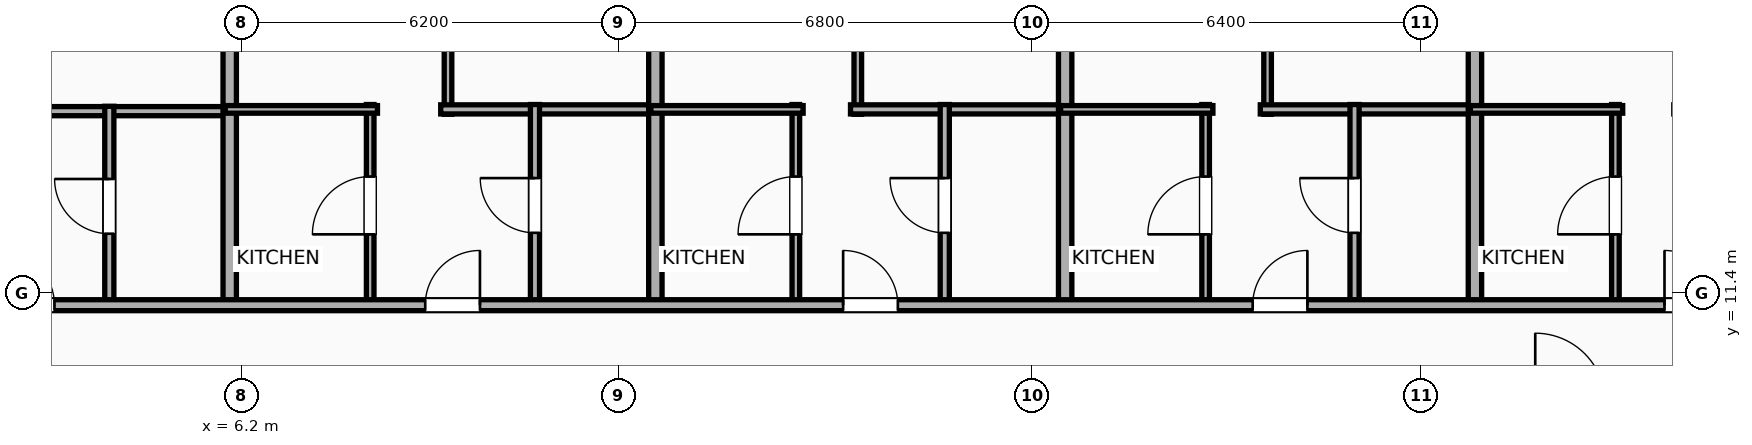
"""IFC4 building model, lengths in metres.
Left out: names, types, materials, properties, quantities, classifications, styles, units other than length and angle.
Written with IfcOpenShell. Run it as: python <this file> out.ifc"""

import sys

from ifc_helpers import new_model, si_unit, direction, frame, frame_2d, origin, place, context, subcontext, project, spatial, rectangle, extrude, element, fill, save


model = new_model("IFC4")
c1 = context("Model", 3, precision=1e-05, world=origin(), true_north=direction((0.0, 1.0)))
c2 = subcontext(c1, "Body", "Model", "MODEL_VIEW")
j1 = project(units=[si_unit("LENGTHUNIT", "METRE"), si_unit("PLANEANGLEUNIT", "RADIAN")], contexts=[c1])
p1 = place(None, origin())
s1 = spatial("IfcSite", under=j1, at=p1, CompositionType="ELEMENT")
p2 = place(p1, origin())
s2 = spatial("IfcBuilding", under=s1, at=p2, CompositionType="ELEMENT")
p3 = place(p2, frame((0.0, 0.0, 120.9)))
s3 = spatial("IfcBuildingStorey", under=s2, at=p3, CompositionType="ELEMENT", Elevation=120.9)
p4 = place(p3, frame((2.47, 14.391, 0.0), z_axis=(0.0, 0.0, 1.0), x_axis=(1.0, 0.0, 0.0)))
e1 = element("IfcWall", 1, at=p4, inside=s3, PredefinedType="PLUMBINGWALL", context=c2, shape_type="SweptSolid", body=[
    extrude(rectangle(XDim=3.605, YDim=0.15, at=frame_2d((1.802, 0.0))), origin(), (0.0, 0.0, 1.0), 3.65),
])
p5 = place(p3, frame((4.02, 11.18, 0.0), z_axis=(0.0, 0.0, 1.0), x_axis=(0.0, 1.0, 0.0)))
e2 = element("IfcWall", 2, at=p5, inside=s3, PredefinedType="PLUMBINGWALL", context=c2, shape_type="SweptSolid", body=[
    extrude(rectangle(XDim=3.291, YDim=0.15, at=frame_2d((1.646, 0.0))), origin(), (0.0, 0.0, 1.0), 3.65),
])
p6 = place(p5, frame((1.196, 0.0, 0.0)))
e3 = element("IfcOpeningElement", 3, at=p6, cuts=e2, PredefinedType="OPENING", context=c2, shape_type="SweptSolid", body=[
    extrude(rectangle(XDim=0.9, YDim=2.05, at=frame_2d((0.45, 1.025))), frame((0.0, 0.085, 0.0), z_axis=(0.0, -1.0, 0.0), x_axis=(1.0, 0.0, 0.0)), (0.0, 0.0, 1.0), 0.17),
])
p7 = place(p3, frame((6.0, 11.12, 0.0), z_axis=(0.0, 0.0, 1.0), x_axis=(0.0, 1.0, 0.0)))
e4 = element("IfcWall", 4, at=p7, inside=s3, PredefinedType="PARTITIONING", context=c2, shape_type="SweptSolid", body=[
    extrude(rectangle(XDim=10.49, YDim=0.22, at=frame_2d((5.245, 0.0))), origin(), (0.0, 0.0, 1.0), 3.04),
])
p8 = place(p3, frame((9.59, 14.34, 0.0), z_axis=(0.0, 0.0, 1.0), x_axis=(0.0, 1.0, 0.0)))
e5 = element("IfcWall", 5, at=p8, inside=s3, PredefinedType="PARTITIONING", context=c2, shape_type="SweptSolid", body=[
    extrude(rectangle(XDim=7.42, YDim=0.125, at=frame_2d((3.71, 0.0))), origin(), (0.0, 0.0, 1.0), 3.65),
])
p9 = place(p8, frame((1.331, 0.0, 0.0)))
e6 = element("IfcOpeningElement", 6, at=p9, cuts=e5, PredefinedType="OPENING", context=c2, shape_type="SweptSolid", body=[
    extrude(rectangle(XDim=0.9, YDim=2.05, at=frame_2d((0.45, 1.025))), frame((0.0, 0.073, 0.0), z_axis=(0.0, -1.0, 0.0), x_axis=(1.0, 0.0, 0.0)), (0.0, 0.0, 1.0), 0.145),
])
p10 = place(p3, frame((9.47, 14.42, 0.0), z_axis=(0.0, 0.0, 1.0), x_axis=(1.0, 0.0, 0.0)))
e7 = element("IfcWall", 7, at=p10, inside=s3, PredefinedType="PLUMBINGWALL", context=c2, shape_type="SweptSolid", body=[
    extrude(rectangle(XDim=3.605, YDim=0.15, at=frame_2d((1.802, 0.0))), origin(), (0.0, 0.0, 1.0), 3.65),
])
p11 = place(p3, frame((8.31, 11.18, 0.0), z_axis=(0.0, 0.0, 1.0), x_axis=(0.0, 1.0, 0.0)))
e8 = element("IfcWall", 8, at=p11, inside=s3, PredefinedType="PARTITIONING", context=c2, shape_type="SweptSolid", body=[
    extrude(rectangle(XDim=3.32, YDim=0.125, at=frame_2d((1.66, 0.0))), origin(), (0.0, 0.0, 1.0), 3.65),
])
p12 = place(p11, frame((1.185, 0.0, 0.0)))
e9 = element("IfcOpeningElement", 9, at=p12, cuts=e8, PredefinedType="OPENING", context=c2, shape_type="SweptSolid", body=[
    extrude(rectangle(XDim=0.95, YDim=2.05, at=frame_2d((0.475, 1.025))), frame((0.0, 0.073, 0.0), z_axis=(0.0, -1.0, 0.0), x_axis=(1.0, 0.0, 0.0)), (0.0, 0.0, 1.0), 0.145),
])
p13 = place(p3, frame((5.925, 14.42, 0.0), z_axis=(0.0, 0.0, 1.0), x_axis=(1.0, 0.0, 0.0)))
e10 = element("IfcWall", 10, at=p13, inside=s3, PredefinedType="PARTITIONING", context=c2, shape_type="SweptSolid", body=[
    extrude(rectangle(XDim=2.505, YDim=0.125, at=frame_2d((1.252, 0.0))), origin(), (0.0, 0.0, 1.0), 3.65),
])
p14 = place(p3, frame((11.02, 11.18, 0.0), z_axis=(0.0, 0.0, 1.0), x_axis=(0.0, 1.0, 0.0)))
e11 = element("IfcWall", 11, at=p14, inside=s3, PredefinedType="PLUMBINGWALL", context=c2, shape_type="SweptSolid", body=[
    extrude(rectangle(XDim=3.32, YDim=0.15, at=frame_2d((1.66, 0.0))), origin(), (0.0, 0.0, 1.0), 3.65),
])
p15 = place(p14, frame((1.21, 0.0, 0.0)))
e12 = element("IfcOpeningElement", 12, at=p15, cuts=e11, PredefinedType="OPENING", context=c2, shape_type="SweptSolid", body=[
    extrude(rectangle(XDim=0.9, YDim=2.05, at=frame_2d((0.45, 1.025))), frame((0.0, 0.085, 0.0), z_axis=(0.0, -1.0, 0.0), x_axis=(1.0, 0.0, 0.0)), (0.0, 0.0, 1.0), 0.17),
])
p16 = place(p3, frame((13.0, 11.12, 0.0), z_axis=(0.0, 0.0, 1.0), x_axis=(0.0, 1.0, 0.0)))
e13 = element("IfcWall", 13, at=p16, inside=s3, PredefinedType="PARTITIONING", context=c2, shape_type="SweptSolid", body=[
    extrude(rectangle(XDim=10.49, YDim=0.22, at=frame_2d((5.245, 0.0))), origin(), (0.0, 0.0, 1.0), 3.65),
])
p17 = place(p3, frame((16.329, 14.34, 0.0), z_axis=(0.0, 0.0, 1.0), x_axis=(0.0, 1.0, 0.0)))
e14 = element("IfcWall", 14, at=p17, inside=s3, PredefinedType="PARTITIONING", context=c2, shape_type="SweptSolid", body=[
    extrude(rectangle(XDim=7.42, YDim=0.125, at=frame_2d((3.71, 0.0))), origin(), (0.0, 0.0, 1.0), 3.65),
])
p18 = place(p17, frame((1.331, 0.0, 0.0)))
e15 = element("IfcOpeningElement", 15, at=p18, cuts=e14, PredefinedType="OPENING", context=c2, shape_type="SweptSolid", body=[
    extrude(rectangle(XDim=0.9, YDim=2.05, at=frame_2d((0.45, 1.025))), frame((0.0, 0.073, 0.0), z_axis=(0.0, -1.0, 0.0), x_axis=(1.0, 0.0, 0.0)), (0.0, 0.0, 1.0), 0.145),
])
p19 = place(p3, frame((16.209, 14.42, 0.0), z_axis=(0.0, 0.0, 1.0), x_axis=(1.0, 0.0, 0.0)))
e16 = element("IfcWall", 16, at=p19, inside=s3, PredefinedType="PLUMBINGWALL", context=c2, shape_type="SweptSolid", body=[
    extrude(rectangle(XDim=3.605, YDim=0.15, at=frame_2d((1.802, 0.0))), origin(), (0.0, 0.0, 1.0), 3.65),
])
p20 = place(p3, frame((15.31, 11.18, 0.0), z_axis=(0.0, 0.0, 1.0), x_axis=(0.0, 1.0, 0.0)))
e17 = element("IfcWall", 17, at=p20, inside=s3, PredefinedType="PARTITIONING", context=c2, shape_type="SweptSolid", body=[
    extrude(rectangle(XDim=3.32, YDim=0.125, at=frame_2d((1.66, 0.0))), origin(), (0.0, 0.0, 1.0), 3.65),
])
p21 = place(p20, frame((1.185, 0.0, 0.0)))
e18 = element("IfcOpeningElement", 18, at=p21, cuts=e17, PredefinedType="OPENING", context=c2, shape_type="SweptSolid", body=[
    extrude(rectangle(XDim=0.95, YDim=2.05, at=frame_2d((0.475, 1.025))), frame((0.0, 0.073, 0.0), z_axis=(0.0, -1.0, 0.0), x_axis=(1.0, 0.0, 0.0)), (0.0, 0.0, 1.0), 0.145),
])
p22 = place(p3, frame((12.925, 14.42, 0.0), z_axis=(0.0, 0.0, 1.0), x_axis=(1.0, 0.0, 0.0)))
e19 = element("IfcWall", 19, at=p22, inside=s3, PredefinedType="PARTITIONING", context=c2, shape_type="SweptSolid", body=[
    extrude(rectangle(XDim=2.505, YDim=0.125, at=frame_2d((1.252, 0.0))), origin(), (0.0, 0.0, 1.0), 3.65),
])
p23 = place(p3, frame((17.759, 11.18, 0.0), z_axis=(0.0, 0.0, 1.0), x_axis=(0.0, 1.0, 0.0)))
e20 = element("IfcWall", 20, at=p23, inside=s3, PredefinedType="PLUMBINGWALL", context=c2, shape_type="SweptSolid", body=[
    extrude(rectangle(XDim=3.32, YDim=0.15, at=frame_2d((1.66, 0.0))), origin(), (0.0, 0.0, 1.0), 3.65),
])
p24 = place(p23, frame((1.21, 0.0, 0.0)))
e21 = element("IfcOpeningElement", 21, at=p24, cuts=e20, PredefinedType="OPENING", context=c2, shape_type="SweptSolid", body=[
    extrude(rectangle(XDim=0.9, YDim=2.05, at=frame_2d((0.45, 1.025))), frame((0.0, 0.085, 0.0), z_axis=(0.0, -1.0, 0.0), x_axis=(1.0, 0.0, 0.0)), (0.0, 0.0, 1.0), 0.17),
])
p25 = place(p3, frame((19.739, 11.12, 0.0), z_axis=(0.0, 0.0, 1.0), x_axis=(0.0, 1.0, 0.0)))
e22 = element("IfcWall", 22, at=p25, inside=s3, PredefinedType="PARTITIONING", context=c2, shape_type="SweptSolid", body=[
    extrude(rectangle(XDim=10.49, YDim=0.22, at=frame_2d((5.245, 0.0))), origin(), (0.0, 0.0, 1.0), 3.65),
])
p26 = place(p3, frame((23.068, 14.34, 0.0), z_axis=(0.0, 0.0, 1.0), x_axis=(0.0, 1.0, 0.0)))
e23 = element("IfcWall", 23, at=p26, inside=s3, PredefinedType="PARTITIONING", context=c2, shape_type="SweptSolid", body=[
    extrude(rectangle(XDim=7.42, YDim=0.125, at=frame_2d((3.71, 0.0))), origin(), (0.0, 0.0, 1.0), 3.65),
])
p27 = place(p26, frame((1.331, 0.0, 0.0)))
e24 = element("IfcOpeningElement", 24, at=p27, cuts=e23, PredefinedType="OPENING", context=c2, shape_type="SweptSolid", body=[
    extrude(rectangle(XDim=0.9, YDim=2.05, at=frame_2d((0.45, 1.025))), frame((0.0, 0.073, 0.0), z_axis=(0.0, -1.0, 0.0), x_axis=(1.0, 0.0, 0.0)), (0.0, 0.0, 1.0), 0.145),
])
p28 = place(p3, frame((22.948, 14.42, 0.0), z_axis=(0.0, 0.0, 1.0), x_axis=(1.0, 0.0, 0.0)))
e25 = element("IfcWall", 25, at=p28, inside=s3, PredefinedType="PLUMBINGWALL", context=c2, shape_type="SweptSolid", body=[
    extrude(rectangle(XDim=3.605, YDim=0.15, at=frame_2d((1.802, 0.0))), origin(), (0.0, 0.0, 1.0), 3.65),
])
p29 = place(p3, frame((22.049, 11.18, 0.0), z_axis=(0.0, 0.0, 1.0), x_axis=(0.0, 1.0, 0.0)))
e26 = element("IfcWall", 26, at=p29, inside=s3, PredefinedType="PARTITIONING", context=c2, shape_type="SweptSolid", body=[
    extrude(rectangle(XDim=3.32, YDim=0.125, at=frame_2d((1.66, 0.0))), origin(), (0.0, 0.0, 1.0), 3.65),
])
p30 = place(p29, frame((1.185, 0.0, 0.0)))
e27 = element("IfcOpeningElement", 27, at=p30, cuts=e26, PredefinedType="OPENING", context=c2, shape_type="SweptSolid", body=[
    extrude(rectangle(XDim=0.95, YDim=2.05, at=frame_2d((0.475, 1.025))), frame((0.0, 0.073, 0.0), z_axis=(0.0, -1.0, 0.0), x_axis=(1.0, 0.0, 0.0)), (0.0, 0.0, 1.0), 0.145),
])
p31 = place(p3, frame((19.664, 14.42, 0.0), z_axis=(0.0, 0.0, 1.0), x_axis=(1.0, 0.0, 0.0)))
e28 = element("IfcWall", 28, at=p31, inside=s3, PredefinedType="PARTITIONING", context=c2, shape_type="SweptSolid", body=[
    extrude(rectangle(XDim=2.505, YDim=0.125, at=frame_2d((1.252, 0.0))), origin(), (0.0, 0.0, 1.0), 3.65),
])
p32 = place(p3, frame((24.498, 11.18, 0.0), z_axis=(0.0, 0.0, 1.0), x_axis=(0.0, 1.0, 0.0)))
e29 = element("IfcWall", 29, at=p32, inside=s3, PredefinedType="PLUMBINGWALL", context=c2, shape_type="SweptSolid", body=[
    extrude(rectangle(XDim=3.32, YDim=0.15, at=frame_2d((1.66, 0.0))), origin(), (0.0, 0.0, 1.0), 3.65),
])
p33 = place(p32, frame((1.21, 0.0, 0.0)))
e30 = element("IfcOpeningElement", 30, at=p33, cuts=e29, PredefinedType="OPENING", context=c2, shape_type="SweptSolid", body=[
    extrude(rectangle(XDim=0.9, YDim=2.05, at=frame_2d((0.45, 1.025))), frame((0.0, 0.085, 0.0), z_axis=(0.0, -1.0, 0.0), x_axis=(1.0, 0.0, 0.0)), (0.0, 0.0, 1.0), 0.17),
])
p34 = place(p3, frame((26.478, 11.12, 0.0), z_axis=(0.0, 0.0, 1.0), x_axis=(0.0, 1.0, 0.0)))
e31 = element("IfcWall", 31, at=p34, inside=s3, PredefinedType="PARTITIONING", context=c2, shape_type="SweptSolid", body=[
    extrude(rectangle(XDim=10.49, YDim=0.22, at=frame_2d((5.245, 0.0))), origin(), (0.0, 0.0, 1.0), 3.65),
])
p35 = place(p3, frame((28.788, 11.18, 0.0), z_axis=(0.0, 0.0, 1.0), x_axis=(0.0, 1.0, 0.0)))
e32 = element("IfcWall", 32, at=p35, inside=s3, PredefinedType="PARTITIONING", context=c2, shape_type="SweptSolid", body=[
    extrude(rectangle(XDim=3.32, YDim=0.125, at=frame_2d((1.66, 0.0))), origin(), (0.0, 0.0, 1.0), 3.65),
])
p36 = place(p35, frame((1.185, 0.0, 0.0)))
e33 = element("IfcOpeningElement", 33, at=p36, cuts=e32, PredefinedType="OPENING", context=c2, shape_type="SweptSolid", body=[
    extrude(rectangle(XDim=0.95, YDim=2.05, at=frame_2d((0.475, 1.025))), frame((0.0, 0.073, 0.0), z_axis=(0.0, -1.0, 0.0), x_axis=(1.0, 0.0, 0.0)), (0.0, 0.0, 1.0), 0.145),
])
p37 = place(p3, frame((26.403, 14.42, 0.0), z_axis=(0.0, 0.0, 1.0), x_axis=(1.0, 0.0, 0.0)))
e34 = element("IfcWall", 34, at=p37, inside=s3, PredefinedType="PARTITIONING", context=c2, shape_type="SweptSolid", body=[
    extrude(rectangle(XDim=2.505, YDim=0.125, at=frame_2d((1.252, 0.0))), origin(), (0.0, 0.0, 1.0), 3.65),
])
p38 = place(p3, frame((-29.21, 11.2, 0.0), z_axis=(0.0, 0.0, 1.0), x_axis=(1.0, 0.0, 0.0)))
e35 = element("IfcWall", 35, at=p38, inside=s3, PredefinedType="PARTITIONING", context=c2, shape_type="SweptSolid", body=[
    extrude(rectangle(XDim=62.42, YDim=0.18, at=frame_2d((31.21, 0.0))), origin(), (0.0, 0.0, 1.0), 3.65),
])
p39 = place(p38, frame((3.108, 0.0, 0.0)))
e36 = element("IfcOpeningElement", 36, at=p39, cuts=e35, PredefinedType="OPENING", context=c2, shape_type="SweptSolid", body=[
    extrude(rectangle(XDim=1.15, YDim=2.05, at=frame_2d((0.575, 1.025))), frame((0.0, 0.1, 0.0), z_axis=(0.0, -1.0, 0.0), x_axis=(1.0, 0.0, 0.0)), (0.0, 0.0, 1.0), 0.2),
])
p40 = place(p38, frame((10.242, 0.0, 0.0)))
e37 = element("IfcOpeningElement", 37, at=p40, cuts=e35, PredefinedType="OPENING", context=c2, shape_type="SweptSolid", body=[
    extrude(rectangle(XDim=1.15, YDim=2.05, at=frame_2d((0.575, 1.025))), frame((0.0, 0.1, 0.0), z_axis=(0.0, -1.0, 0.0), x_axis=(1.0, 0.0, 0.0)), (0.0, 0.0, 1.0), 0.2),
])
p41 = place(p38, frame((17.427, 0.0, 0.0)))
e38 = element("IfcOpeningElement", 38, at=p41, cuts=e35, PredefinedType="OPENING", context=c2, shape_type="SweptSolid", body=[
    extrude(rectangle(XDim=0.9, YDim=2.05, at=frame_2d((0.45, 1.025))), frame((0.0, 0.1, 0.0), z_axis=(0.0, -1.0, 0.0), x_axis=(1.0, 0.0, 0.0)), (0.0, 0.0, 1.0), 0.2),
])
p42 = place(p38, frame((24.424, 0.0, 0.0)))
e39 = element("IfcOpeningElement", 39, at=p42, cuts=e35, PredefinedType="OPENING", context=c2, shape_type="SweptSolid", body=[
    extrude(rectangle(XDim=0.9, YDim=2.05, at=frame_2d((0.45, 1.025))), frame((0.0, 0.1, 0.0), z_axis=(0.0, -1.0, 0.0), x_axis=(1.0, 0.0, 0.0)), (0.0, 0.0, 1.0), 0.2),
])
p43 = place(p38, frame((31.428, 0.0, 0.0)))
e40 = element("IfcOpeningElement", 40, at=p43, cuts=e35, PredefinedType="OPENING", context=c2, shape_type="SweptSolid", body=[
    extrude(rectangle(XDim=0.9, YDim=2.05, at=frame_2d((0.45, 1.025))), frame((0.0, 0.1, 0.0), z_axis=(0.0, -1.0, 0.0), x_axis=(1.0, 0.0, 0.0)), (0.0, 0.0, 1.0), 0.2),
])
p44 = place(p38, frame((38.425, 0.0, 0.0)))
e41 = element("IfcOpeningElement", 41, at=p44, cuts=e35, PredefinedType="OPENING", context=c2, shape_type="SweptSolid", body=[
    extrude(rectangle(XDim=0.9, YDim=2.05, at=frame_2d((0.45, 1.025))), frame((0.0, 0.1, 0.0), z_axis=(0.0, -1.0, 0.0), x_axis=(1.0, 0.0, 0.0)), (0.0, 0.0, 1.0), 0.2),
])
p45 = place(p38, frame((45.298, 0.0, 0.0)))
e42 = element("IfcOpeningElement", 42, at=p45, cuts=e35, PredefinedType="OPENING", context=c2, shape_type="SweptSolid", body=[
    extrude(rectangle(XDim=0.9, YDim=2.05, at=frame_2d((0.45, 1.025))), frame((0.0, 0.1, 0.0), z_axis=(0.0, -1.0, 0.0), x_axis=(1.0, 0.0, 0.0)), (0.0, 0.0, 1.0), 0.2),
])
p46 = place(p38, frame((52.033, 0.0, 0.0)))
e43 = element("IfcOpeningElement", 43, at=p46, cuts=e35, PredefinedType="OPENING", context=c2, shape_type="SweptSolid", body=[
    extrude(rectangle(XDim=0.9, YDim=2.05, at=frame_2d((0.45, 1.025))), frame((0.0, 0.1, 0.0), z_axis=(0.0, -1.0, 0.0), x_axis=(1.0, 0.0, 0.0)), (0.0, 0.0, 1.0), 0.2),
])
p47 = place(p38, frame((58.805, 0.0, 0.0)))
e44 = element("IfcOpeningElement", 44, at=p47, cuts=e35, PredefinedType="OPENING", context=c2, shape_type="SweptSolid", body=[
    extrude(rectangle(XDim=0.9, YDim=2.05, at=frame_2d((0.45, 1.025))), frame((0.0, 0.1, 0.0), z_axis=(0.0, -1.0, 0.0), x_axis=(1.0, 0.0, 0.0)), (0.0, 0.0, 1.0), 0.2),
])
p48 = place(p6, origin())
e45 = element("IfcDoor", 45, at=p48, inside=s3, OperationType="SINGLE_SWING_RIGHT", PredefinedType="DOOR", context=c2, shape_type="SweptSolid", body=[
    extrude(rectangle(XDim=0.9, YDim=2.05, at=frame_2d((0.45, 1.025))), frame((0.0, 0.025, 0.0), z_axis=(0.0, -1.0, 0.0), x_axis=(1.0, 0.0, 0.0)), (0.0, 0.0, 1.0), 0.05),
])
fill(e3, e45)
p49 = place(p12, origin())
e46 = element("IfcDoor", 46, at=p49, inside=s3, OperationType="SINGLE_SWING_LEFT", PredefinedType="DOOR", context=c2, shape_type="SweptSolid", body=[
    extrude(rectangle(XDim=0.95, YDim=2.05, at=frame_2d((0.475, 1.025))), frame((0.0, 0.025, 0.0), z_axis=(0.0, -1.0, 0.0), x_axis=(1.0, 0.0, 0.0)), (0.0, 0.0, 1.0), 0.05),
])
fill(e9, e46)
p50 = place(p15, origin())
e47 = element("IfcDoor", 47, at=p50, inside=s3, OperationType="SINGLE_SWING_RIGHT", PredefinedType="DOOR", context=c2, shape_type="SweptSolid", body=[
    extrude(rectangle(XDim=0.9, YDim=2.05, at=frame_2d((0.45, 1.025))), frame((0.0, 0.025, 0.0), z_axis=(0.0, -1.0, 0.0), x_axis=(1.0, 0.0, 0.0)), (0.0, 0.0, 1.0), 0.05),
])
fill(e12, e47)
p51 = place(p21, origin())
e48 = element("IfcDoor", 48, at=p51, inside=s3, OperationType="SINGLE_SWING_LEFT", PredefinedType="DOOR", context=c2, shape_type="SweptSolid", body=[
    extrude(rectangle(XDim=0.95, YDim=2.05, at=frame_2d((0.475, 1.025))), frame((0.0, 0.025, 0.0), z_axis=(0.0, -1.0, 0.0), x_axis=(1.0, 0.0, 0.0)), (0.0, 0.0, 1.0), 0.05),
])
fill(e18, e48)
p52 = place(p24, origin())
e49 = element("IfcDoor", 49, at=p52, inside=s3, OperationType="SINGLE_SWING_RIGHT", PredefinedType="DOOR", context=c2, shape_type="SweptSolid", body=[
    extrude(rectangle(XDim=0.9, YDim=2.05, at=frame_2d((0.45, 1.025))), frame((0.0, 0.025, 0.0), z_axis=(0.0, -1.0, 0.0), x_axis=(1.0, 0.0, 0.0)), (0.0, 0.0, 1.0), 0.05),
])
fill(e21, e49)
p53 = place(p30, origin())
e50 = element("IfcDoor", 50, at=p53, inside=s3, OperationType="SINGLE_SWING_LEFT", PredefinedType="DOOR", context=c2, shape_type="SweptSolid", body=[
    extrude(rectangle(XDim=0.95, YDim=2.05, at=frame_2d((0.475, 1.025))), frame((0.0, 0.025, 0.0), z_axis=(0.0, -1.0, 0.0), x_axis=(1.0, 0.0, 0.0)), (0.0, 0.0, 1.0), 0.05),
])
fill(e27, e50)
p54 = place(p33, origin())
e51 = element("IfcDoor", 51, at=p54, inside=s3, OperationType="SINGLE_SWING_RIGHT", PredefinedType="DOOR", context=c2, shape_type="SweptSolid", body=[
    extrude(rectangle(XDim=0.9, YDim=2.05, at=frame_2d((0.45, 1.025))), frame((0.0, 0.025, 0.0), z_axis=(0.0, -1.0, 0.0), x_axis=(1.0, 0.0, 0.0)), (0.0, 0.0, 1.0), 0.05),
])
fill(e30, e51)
p55 = place(p36, origin())
e52 = element("IfcDoor", 52, at=p55, inside=s3, OperationType="SINGLE_SWING_LEFT", PredefinedType="DOOR", context=c2, shape_type="SweptSolid", body=[
    extrude(rectangle(XDim=0.95, YDim=2.05, at=frame_2d((0.475, 1.025))), frame((0.0, 0.025, 0.0), z_axis=(0.0, -1.0, 0.0), x_axis=(1.0, 0.0, 0.0)), (0.0, 0.0, 1.0), 0.05),
])
fill(e33, e52)
p56 = place(p43, origin())
e53 = element("IfcDoor", 53, at=p56, inside=s3, OperationType="SINGLE_SWING_LEFT", PredefinedType="DOOR", context=c2, shape_type="SweptSolid", body=[
    extrude(rectangle(XDim=0.9, YDim=2.05, at=frame_2d((0.45, 1.025))), frame((0.0, 0.025, 0.0), z_axis=(0.0, -1.0, 0.0), x_axis=(1.0, 0.0, 0.0)), (0.0, 0.0, 1.0), 0.05),
])
fill(e40, e53)
p57 = place(p44, origin())
e54 = element("IfcDoor", 54, at=p57, inside=s3, OperationType="SINGLE_SWING_RIGHT", PredefinedType="DOOR", context=c2, shape_type="SweptSolid", body=[
    extrude(rectangle(XDim=0.9, YDim=2.05, at=frame_2d((0.45, 1.025))), frame((0.0, 0.025, 0.0), z_axis=(0.0, -1.0, 0.0), x_axis=(1.0, 0.0, 0.0)), (0.0, 0.0, 1.0), 0.05),
])
fill(e41, e54)
p58 = place(p45, origin())
e55 = element("IfcDoor", 55, at=p58, inside=s3, OperationType="SINGLE_SWING_LEFT", PredefinedType="DOOR", context=c2, shape_type="SweptSolid", body=[
    extrude(rectangle(XDim=0.9, YDim=2.05, at=frame_2d((0.45, 1.025))), frame((0.0, 0.025, 0.0), z_axis=(0.0, -1.0, 0.0), x_axis=(1.0, 0.0, 0.0)), (0.0, 0.0, 1.0), 0.05),
])
fill(e42, e55)
p59 = place(p46, origin())
e56 = element("IfcDoor", 56, at=p59, inside=s3, OperationType="SINGLE_SWING_RIGHT", PredefinedType="DOOR", context=c2, shape_type="SweptSolid", body=[
    extrude(rectangle(XDim=0.9, YDim=2.05, at=frame_2d((0.45, 1.025))), frame((0.0, 0.025, 0.0), z_axis=(0.0, -1.0, 0.0), x_axis=(1.0, 0.0, 0.0)), (0.0, 0.0, 1.0), 0.05),
])
fill(e43, e56)
p60 = place(p47, origin())
e57 = element("IfcDoor", 57, at=p60, inside=s3, OperationType="SINGLE_SWING_LEFT", PredefinedType="DOOR", context=c2, shape_type="SweptSolid", body=[
    extrude(rectangle(XDim=0.9, YDim=2.05, at=frame_2d((0.45, 1.025))), frame((0.0, 0.025, 0.0), z_axis=(0.0, -1.0, 0.0), x_axis=(1.0, 0.0, 0.0)), (0.0, 0.0, 1.0), 0.05),
])
fill(e44, e57)
save(model, sys.argv[1])
